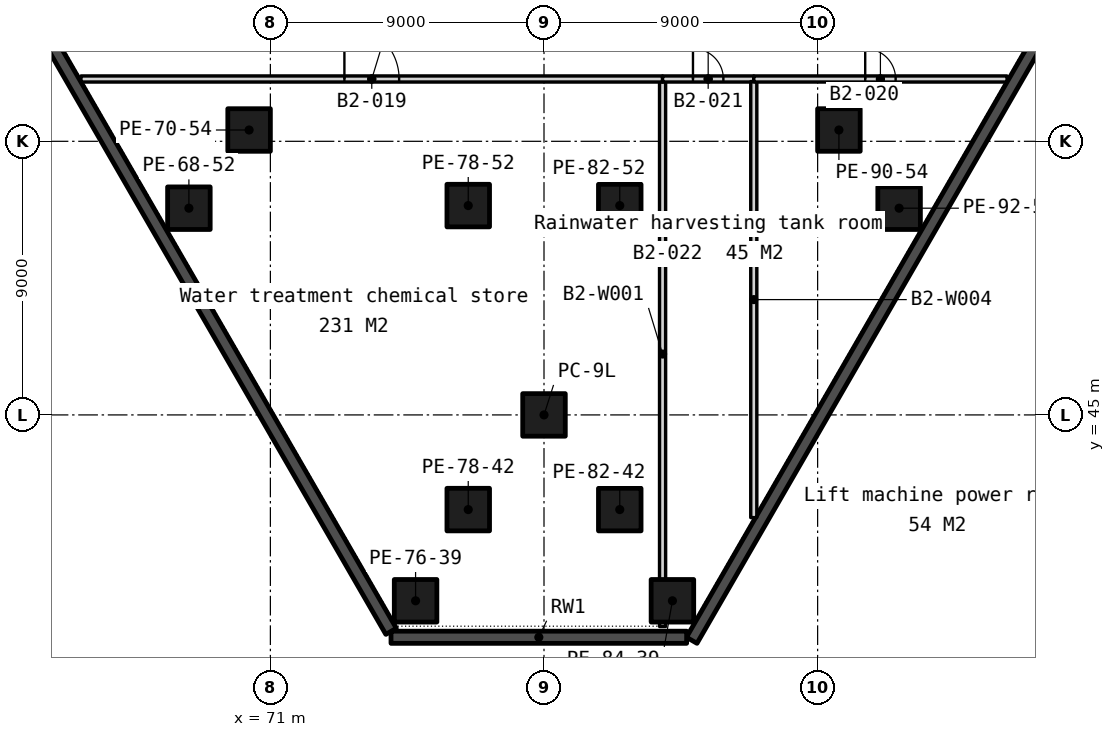
"""IFC4 building model, lengths in metres.
Left out: names, types, materials, properties, quantities, classifications, styles, units other than length and angle.
Written with IfcOpenShell. Run it as: python <this file> out.ifc"""

import sys

from ifc_helpers import new_model, si_unit, direction, frame, frame_2d, origin, origin_2d, place, context, subcontext, project, spatial, rectangle, extrude, element, fill, save


model = new_model("IFC4")
c1 = context("Model", 3, precision=1e-05, world=origin(), true_north=direction((0.0, 1.0)))
c2 = subcontext(c1, "Body", "Model", "MODEL_VIEW")
j1 = project(units=[si_unit("LENGTHUNIT", "METRE"), si_unit("PLANEANGLEUNIT", "RADIAN")], contexts=[c1])
p1 = place(None, origin())
s1 = spatial("IfcSite", under=j1, at=p1, CompositionType="ELEMENT")
p2 = place(p1, origin())
s2 = spatial("IfcBuilding", under=s1, at=p2, CompositionType="ELEMENT")
p3 = place(p2, frame((0.0, 0.0, -9.0)))
s3 = spatial("IfcBuildingStorey", under=s2, at=p3, CompositionType="ELEMENT", Elevation=-9.0)
p4 = place(p3, frame((137.688, 129.089, -0.3), z_axis=(0.0, 0.0, 1.0), x_axis=(-0.499999742059, -0.866025552707, 0.0)))
e1 = element("IfcWall", 1, at=p4, inside=s3, PredefinedType="SOLIDWALL", context=c2, shape_type="SweptSolid", body=[
    extrude(rectangle(XDim=105.659, YDim=0.4, at=frame_2d((52.829, 0.0))), origin(), (0.0, 0.0, 1.0), 4.55),
])
p5 = place(p3, frame((84.692, 37.686, -0.3), z_axis=(0.0, 0.0, 1.0), x_axis=(-1.0, 0.0, 0.0)))
e2 = element("IfcWall", 2, at=p5, inside=s3, PredefinedType="SOLIDWALL", context=c2, shape_type="SweptSolid", body=[
    extrude(rectangle(XDim=9.724, YDim=0.4, at=frame_2d((4.862, 0.0))), origin(), (0.0, 0.0, 1.0), 4.55),
])
p6 = place(p3, frame((74.971, 37.881, -0.3), z_axis=(0.0, 0.0, 1.0), x_axis=(-0.499999742059, 0.866025552707, 0.0)))
e3 = element("IfcWall", 3, at=p6, inside=s3, PredefinedType="SOLIDWALL", context=c2, shape_type="SweptSolid", body=[
    extrude(rectangle(XDim=105.659, YDim=0.4, at=frame_2d((52.829, 0.0))), origin(), (0.0, 0.0, 1.0), 4.55),
])
for number, where, z_axis, x_axis in (
    (4, (80.0, 45.0, 0.0), (0.0, 0.0, 1.0), (1.0, 0.0, 0.0)),
    (5, (68.32, 51.8, 0.0), (0.0, 0.0, 1.0), (1.0, 0.0, 0.0)),
    (6, (70.3, 54.372, 0.0), (0.0, 0.0, 1.0), (1.0, 0.0, 0.0)),
    (7, (75.776, 38.886, 0.0), (0.0, 0.0, 1.0), (1.0, 0.0, 0.0)),
    (8, (77.508, 41.886, 0.0), (0.0, 0.0, 1.0), (1.0, 0.0, 0.0)),
    (9, (77.508, 51.886, 0.0), (0.0, 0.0, 1.0), (1.0, 0.0, 0.0)),
    (10, (82.492, 41.886, 0.0), (0.0, 0.0, 1.0), (1.0, 0.0, 0.0)),
    (11, (82.492, 51.886, 0.0), (0.0, 0.0, 1.0), (1.0, 0.0, 0.0)),
    (12, (84.224, 38.886, 0.0), (0.0, 0.0, 1.0), (1.0, 0.0, 0.0)),
    (13, (89.7, 54.372, 0.0), (0.0, 0.0, 1.0), (1.0, 0.0, 0.0)),
    (14, (91.68, 51.8, 0.0), (0.0, 0.0, 1.0), (1.0, 0.0, 0.0)),
):
    element("IfcColumn", number, at=place(p3, frame(where, z_axis=z_axis, x_axis=x_axis)), inside=s3, PredefinedType="COLUMN", context=c2, shape_type="SweptSolid", body=[
        extrude(rectangle(XDim=1.4, YDim=1.4, at=origin_2d()), origin(), (0.0, 0.0, 1.0), 4.5),
    ])
p7 = place(p3, frame((83.9, 38.04, 0.0), z_axis=(0.0, 0.0, 1.0), x_axis=(0.0, 1.0, 0.0)))
e15 = element("IfcWall", 15, at=p7, inside=s3, PredefinedType="PARTITIONING", context=c2, shape_type="SweptSolid", body=[
    extrude(rectangle(XDim=17.925, YDim=0.2, at=frame_2d((8.962, 0.0))), origin(), (0.0, 0.0, 1.0), 4.25),
])
p8 = place(p3, frame((64.77, 56.05, 0.0), z_axis=(0.0, 0.0, 1.0), x_axis=(1.0, 0.0, 0.0)))
e16 = element("IfcWall", 16, at=p8, inside=s3, PredefinedType="PARTITIONING", context=c2, shape_type="SweptSolid", body=[
    extrude(rectangle(XDim=19.13, YDim=0.2, at=frame_2d((9.565, 0.0))), origin(), (0.0, 0.0, 1.0), 4.25),
])
p9 = place(p8, frame((8.665, 0.0, 0.0)))
e17 = element("IfcOpeningElement", 17, at=p9, cuts=e16, PredefinedType="OPENING", context=c2, shape_type="SweptSolid", body=[
    extrude(rectangle(XDim=1.8, YDim=2.1, at=frame_2d((0.9, 1.05))), frame((0.0, 0.11, 0.0), z_axis=(0.0, -1.0, 0.0), x_axis=(1.0, 0.0, 0.0)), (0.0, 0.0, 1.0), 0.22),
])
p10 = place(p3, frame((83.9, 56.05, 0.0), z_axis=(0.0, 0.0, 1.0), x_axis=(1.0, 0.0, 0.0)))
e18 = element("IfcWall", 18, at=p10, inside=s3, PredefinedType="PARTITIONING", context=c2, shape_type="SweptSolid", body=[
    extrude(rectangle(XDim=3.0, YDim=0.2, at=frame_2d((1.5, 0.0))), origin(), (0.0, 0.0, 1.0), 4.25),
])
p11 = place(p10, frame((1.0, 0.0, 0.0)))
e19 = element("IfcOpeningElement", 19, at=p11, cuts=e18, PredefinedType="OPENING", context=c2, shape_type="SweptSolid", body=[
    extrude(rectangle(XDim=1.0, YDim=2.1, at=frame_2d((0.5, 1.05))), frame((0.0, 0.11, 0.0), z_axis=(0.0, -1.0, 0.0), x_axis=(1.0, 0.0, 0.0)), (0.0, 0.0, 1.0), 0.22),
])
p12 = place(p3, frame((86.9, 41.622, 0.0), z_axis=(0.0, 0.0, 1.0), x_axis=(0.0, 1.0, 0.0)))
e20 = element("IfcWall", 20, at=p12, inside=s3, PredefinedType="PARTITIONING", context=c2, shape_type="SweptSolid", body=[
    extrude(rectangle(XDim=14.344, YDim=0.2, at=frame_2d((7.172, 0.0))), origin(), (0.0, 0.0, 1.0), 4.25),
])
p13 = place(p3, frame((86.9, 56.05, 0.0), z_axis=(0.0, 0.0, 1.0), x_axis=(1.0, 0.0, 0.0)))
e21 = element("IfcWall", 21, at=p13, inside=s3, PredefinedType="PARTITIONING", context=c2, shape_type="SweptSolid", body=[
    extrude(rectangle(XDim=8.33, YDim=0.2, at=frame_2d((4.165, 0.0))), origin(), (0.0, 0.0, 1.0), 4.25),
])
p14 = place(p13, frame((3.665, 0.0, 0.0)))
e22 = element("IfcOpeningElement", 22, at=p14, cuts=e21, PredefinedType="OPENING", context=c2, shape_type="SweptSolid", body=[
    extrude(rectangle(XDim=1.0, YDim=2.1, at=frame_2d((0.5, 1.05))), frame((0.0, 0.11, 0.0), z_axis=(0.0, -1.0, 0.0), x_axis=(1.0, 0.0, 0.0)), (0.0, 0.0, 1.0), 0.22),
])
p15 = place(p9, origin())
e23 = element("IfcDoor", 23, at=p15, inside=s3, OperationType="SINGLE_SWING_LEFT", PredefinedType="DOOR", context=c2, shape_type="SweptSolid", body=[
    extrude(rectangle(XDim=1.8, YDim=2.1, at=frame_2d((0.9, 1.05))), frame((0.0, 0.025, 0.0), z_axis=(0.0, -1.0, 0.0), x_axis=(1.0, 0.0, 0.0)), (0.0, 0.0, 1.0), 0.05),
])
fill(e17, e23)
p16 = place(p14, origin())
e24 = element("IfcDoor", 24, at=p16, inside=s3, OperationType="SINGLE_SWING_LEFT", PredefinedType="DOOR", context=c2, shape_type="SweptSolid", body=[
    extrude(rectangle(XDim=1.0, YDim=2.1, at=frame_2d((0.5, 1.05))), frame((0.0, 0.025, 0.0), z_axis=(0.0, -1.0, 0.0), x_axis=(1.0, 0.0, 0.0)), (0.0, 0.0, 1.0), 0.05),
])
fill(e22, e24)
p17 = place(p11, origin())
e25 = element("IfcDoor", 25, at=p17, inside=s3, OperationType="SINGLE_SWING_LEFT", PredefinedType="DOOR", context=c2, shape_type="SweptSolid", body=[
    extrude(rectangle(XDim=1.0, YDim=2.1, at=frame_2d((0.5, 1.05))), frame((0.0, 0.025, 0.0), z_axis=(0.0, -1.0, 0.0), x_axis=(1.0, 0.0, 0.0)), (0.0, 0.0, 1.0), 0.05),
])
fill(e19, e25)
save(model, sys.argv[1])
